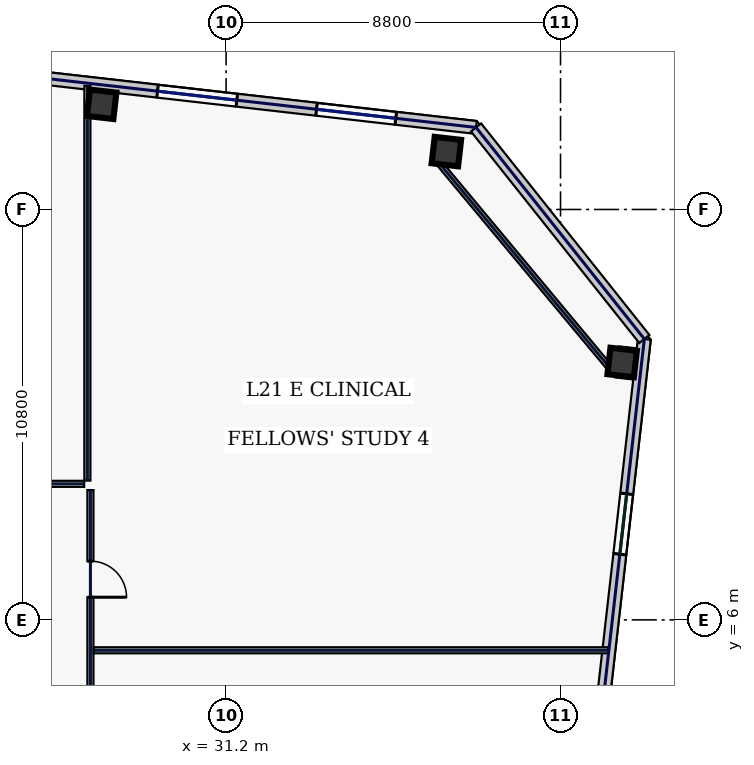
"""IFC4 building model, lengths in metres.
Left out: names, types, materials, properties, quantities, classifications, styles, units other than length and angle.
Written with IfcOpenShell. Run it as: python <this file> out.ifc"""

import sys

from ifc_helpers import new_model, si_unit, direction, frame, frame_2d, origin, origin_2d, place, context, subcontext, project, spatial, rectangle, hollow_rectangle, extrude, element, fill, save


model = new_model("IFC4")
c1 = context("Model", 3, precision=1e-05, world=origin(), true_north=direction((0.0, 1.0)))
c2 = subcontext(c1, "Body", "Model", "MODEL_VIEW")
j1 = project(units=[si_unit("LENGTHUNIT", "METRE"), si_unit("PLANEANGLEUNIT", "RADIAN")], contexts=[c1])
p1 = place(None, origin())
s1 = spatial("IfcSite", under=j1, at=p1, CompositionType="ELEMENT")
p2 = place(p1, origin())
s2 = spatial("IfcBuilding", under=s1, at=p2, CompositionType="ELEMENT")
p3 = place(p2, frame((0.0, 0.0, 97.4)))
s3 = spatial("IfcBuildingStorey", under=s2, at=p3, CompositionType="ELEMENT", Elevation=97.4)
for number, where, z_axis, x_axis in (
    (1, (36.997, 18.323, 0.0), (0.0, 0.0, 1.0), (0.994, -0.113, 0.0)),
    (2, (27.926, 19.568, 0.0), (0.0, 0.0, 1.0), (0.994, -0.113, 0.0)),
    (3, (41.622, 12.774, 0.0), (0.0, 0.0, 1.0), (0.994, -0.113, 0.0)),
):
    element("IfcColumn", number, at=place(p3, frame(where, z_axis=z_axis, x_axis=x_axis)), inside=s3, PredefinedType="COLUMN", context=c2, shape_type="SweptSolid", body=[
        extrude(hollow_rectangle(XDim=0.7, YDim=0.7, WallThickness=0.032, at=origin_2d()), origin(), (0.0, 0.0, 1.0), 3.74),
    ])
p4 = place(p3, frame((37.777, 18.958, 0.0), z_axis=(0.0, 0.0, 1.0), x_axis=(-0.993571362037, 0.113207546299, 0.0)))
e4 = element("IfcWall", 4, at=p4, inside=s3, PredefinedType="STANDARD", context=c2, shape_type="SweptSolid", body=[
    extrude(rectangle(XDim=21.223, YDim=0.34, at=frame_2d((10.611, 0.0))), origin(), (0.0, 0.0, 1.0), 3.74),
])
p5 = place(p4, frame((15.756, 0.0, 0.22)))
e5 = element("IfcOpeningElement", 5, at=p5, cuts=e4, PredefinedType="OPENING", context=c2, shape_type="SweptSolid", body=[
    extrude(rectangle(XDim=1.6, YDim=1.2, at=frame_2d((0.8, 0.6))), frame((0.0, 0.18, 0.0), z_axis=(0.0, -1.0, 0.0), x_axis=(1.0, 0.0, 0.0)), (0.0, 0.0, 1.0), 0.36),
])
p6 = place(p4, frame((11.285, 0.0, 0.67)))
e6 = element("IfcOpeningElement", 6, at=p6, cuts=e4, PredefinedType="OPENING", context=c2, shape_type="SweptSolid", body=[
    extrude(rectangle(XDim=2.1, YDim=2.2, at=frame_2d((1.05, 1.1))), frame((0.0, 0.18, 0.0), z_axis=(0.0, -1.0, 0.0), x_axis=(1.0, 0.0, 0.0)), (0.0, 0.0, 1.0), 0.36),
])
p7 = place(p4, frame((6.336, 0.0, 0.67)))
e7 = element("IfcOpeningElement", 7, at=p7, cuts=e4, PredefinedType="OPENING", context=c2, shape_type="SweptSolid", body=[
    extrude(rectangle(XDim=2.1, YDim=2.2, at=frame_2d((1.05, 1.1))), frame((0.0, 0.18, 0.0), z_axis=(0.0, -1.0, 0.0), x_axis=(1.0, 0.0, 0.0)), (0.0, 0.0, 1.0), 0.36),
])
p8 = place(p4, frame((2.125, 0.0, 0.67)))
e8 = element("IfcOpeningElement", 8, at=p8, cuts=e4, PredefinedType="OPENING", context=c2, shape_type="SweptSolid", body=[
    extrude(rectangle(XDim=2.1, YDim=2.2, at=frame_2d((1.05, 1.1))), frame((0.0, 0.18, 0.0), z_axis=(0.0, -1.0, 0.0), x_axis=(1.0, 0.0, 0.0)), (0.0, 0.0, 1.0), 0.36),
])
p9 = place(p3, frame((37.768, -25.556, 0.0), z_axis=(0.0, 0.0, 1.0), x_axis=(0.113201605824, 0.993572038877, 0.0)))
e9 = element("IfcWall", 9, at=p9, inside=s3, PredefinedType="STANDARD", context=c2, shape_type="SweptSolid", body=[
    extrude(rectangle(XDim=39.2, YDim=0.34, at=frame_2d((19.6, 0.0))), origin(), (0.0, 0.0, 1.0), 3.74),
])
p10 = place(p9, frame((4.1, 0.0, 0.58)))
e10 = element("IfcOpeningElement", 10, at=p10, cuts=e9, PredefinedType="OPENING", context=c2, shape_type="SweptSolid", body=[
    extrude(rectangle(XDim=1.6, YDim=2.3, at=frame_2d((0.8, 1.15))), frame((0.0, 0.18, 0.0), z_axis=(0.0, -1.0, 0.0), x_axis=(1.0, 0.0, 0.0)), (0.0, 0.0, 1.0), 0.36),
])
p11 = place(p9, frame((13.9, 0.0, 0.58)))
e11 = element("IfcOpeningElement", 11, at=p11, cuts=e9, PredefinedType="OPENING", context=c2, shape_type="SweptSolid", body=[
    extrude(rectangle(XDim=1.6, YDim=2.3, at=frame_2d((0.8, 1.15))), frame((0.0, 0.18, 0.0), z_axis=(0.0, -1.0, 0.0), x_axis=(1.0, 0.0, 0.0)), (0.0, 0.0, 1.0), 0.36),
])
p12 = place(p9, frame((23.7, 0.0, 0.58)))
e12 = element("IfcOpeningElement", 12, at=p12, cuts=e9, PredefinedType="OPENING", context=c2, shape_type="SweptSolid", body=[
    extrude(rectangle(XDim=1.6, YDim=2.3, at=frame_2d((0.8, 1.15))), frame((0.0, 0.18, 0.0), z_axis=(0.0, -1.0, 0.0), x_axis=(1.0, 0.0, 0.0)), (0.0, 0.0, 1.0), 0.36),
])
p13 = place(p9, frame((33.5, 0.0, 0.58)))
e13 = element("IfcOpeningElement", 13, at=p13, cuts=e9, PredefinedType="OPENING", context=c2, shape_type="SweptSolid", body=[
    extrude(rectangle(XDim=1.6, YDim=2.3, at=frame_2d((0.8, 1.15))), frame((0.0, 0.18, 0.0), z_axis=(0.0, -1.0, 0.0), x_axis=(1.0, 0.0, 0.0)), (0.0, 0.0, 1.0), 0.36),
])
p14 = place(p3, frame((42.206, 13.392, 0.0), z_axis=(0.0, 0.0, 1.0), x_axis=(-0.622524521309, 0.782600294128, 0.0)))
e14 = element("IfcWall", 14, at=p14, inside=s3, PredefinedType="STANDARD", context=c2, shape_type="SweptSolid", body=[
    extrude(rectangle(XDim=7.113, YDim=0.34, at=frame_2d((3.557, 0.0))), origin(), (0.0, 0.0, 1.0), 3.74),
])
p15 = place(p3, frame((41.361, 12.556, 0.0), z_axis=(0.0, 0.0, 1.0), x_axis=(-0.640217638562, 0.768193579298, 0.0)))
e15 = element("IfcWall", 15, at=p15, inside=s3, PredefinedType="PARTITIONING", context=c2, shape_type="SweptSolid", body=[
    extrude(rectangle(XDim=7.224, YDim=0.16, at=frame_2d((3.612, 0.0))), origin(), (0.0, 0.0, 1.0), 3.74),
])
p16 = place(p3, frame((16.765, 9.58, 0.0), z_axis=(0.0, 0.0, 1.0), x_axis=(1.0, 0.0, 0.0)))
e16 = element("IfcWall", 16, at=p16, inside=s3, PredefinedType="PARTITIONING", context=c2, shape_type="SweptSolid", body=[
    extrude(rectangle(XDim=10.7, YDim=0.16, at=frame_2d((5.35, 0.0))), origin(), (0.0, 0.0, 1.0), 3.74),
])
p17 = place(p16, frame((2.875, 0.0, 0.0)))
e17 = element("IfcOpeningElement", 17, at=p17, cuts=e16, PredefinedType="OPENING", context=c2, shape_type="SweptSolid", body=[
    extrude(rectangle(XDim=0.95, YDim=2.2, at=frame_2d((0.475, 1.1))), frame((0.0, 0.09, 0.0), z_axis=(0.0, -1.0, 0.0), x_axis=(1.0, 0.0, 0.0)), (0.0, 0.0, 1.0), 0.18),
])
p18 = place(p16, frame((7.876, 0.0, 0.0)))
e18 = element("IfcOpeningElement", 18, at=p18, cuts=e16, PredefinedType="OPENING", context=c2, shape_type="SweptSolid", body=[
    extrude(rectangle(XDim=0.95, YDim=2.2, at=frame_2d((0.475, 1.1))), frame((0.0, 0.09, 0.0), z_axis=(0.0, -1.0, 0.0), x_axis=(1.0, 0.0, 0.0)), (0.0, 0.0, 1.0), 0.18),
])
p19 = place(p3, frame((27.63, 9.415, 0.0), z_axis=(0.0, 0.0, 1.0), x_axis=(0.0, -1.0, 0.0)))
e19 = element("IfcWall", 19, at=p19, inside=s3, PredefinedType="PARTITIONING", context=c2, shape_type="SweptSolid", body=[
    extrude(rectangle(XDim=18.63, YDim=0.16, at=frame_2d((9.315, 0.0))), origin(), (0.0, 0.0, 1.0), 3.74),
])
p20 = place(p19, frame((16.081, 0.0, 0.0)))
e20 = element("IfcOpeningElement", 20, at=p20, cuts=e19, PredefinedType="OPENING", context=c2, shape_type="SweptSolid", body=[
    extrude(rectangle(XDim=0.95, YDim=2.2, at=frame_2d((0.475, 1.1))), frame((0.0, 0.09, 0.0), z_axis=(0.0, -1.0, 0.0), x_axis=(1.0, 0.0, 0.0)), (0.0, 0.0, 1.0), 0.18),
])
p21 = place(p19, frame((11.3, 0.0, 0.0)))
e21 = element("IfcOpeningElement", 21, at=p21, cuts=e19, PredefinedType="OPENING", context=c2, shape_type="SweptSolid", body=[
    extrude(rectangle(XDim=0.95, YDim=2.2, at=frame_2d((0.475, 1.1))), frame((0.0, 0.09, 0.0), z_axis=(0.0, -1.0, 0.0), x_axis=(1.0, 0.0, 0.0)), (0.0, 0.0, 1.0), 0.18),
])
p22 = place(p19, frame((5.8, 0.0, 0.0)))
e22 = element("IfcOpeningElement", 22, at=p22, cuts=e19, PredefinedType="OPENING", context=c2, shape_type="SweptSolid", body=[
    extrude(rectangle(XDim=0.95, YDim=2.2, at=frame_2d((0.475, 1.1))), frame((0.0, 0.09, 0.0), z_axis=(0.0, -1.0, 0.0), x_axis=(1.0, 0.0, 0.0)), (0.0, 0.0, 1.0), 0.18),
])
p23 = place(p19, frame((1.869, 0.0, 0.0)))
e23 = element("IfcOpeningElement", 23, at=p23, cuts=e19, PredefinedType="OPENING", context=c2, shape_type="SweptSolid", body=[
    extrude(rectangle(XDim=0.95, YDim=2.2, at=frame_2d((0.475, 1.1))), frame((0.0, 0.09, 0.0), z_axis=(0.0, -1.0, 0.0), x_axis=(1.0, 0.0, 0.0)), (0.0, 0.0, 1.0), 0.18),
])
p24 = place(p3, frame((27.55, 9.665, 0.0), z_axis=(0.0, 0.0, 1.0), x_axis=(0.0, 1.0, 0.0)))
e24 = element("IfcWall", 24, at=p24, inside=s3, PredefinedType="PARTITIONING", context=c2, shape_type="SweptSolid", body=[
    extrude(rectangle(XDim=10.388, YDim=0.16, at=frame_2d((5.194, 0.0))), origin(), (0.0, 0.0, 1.0), 3.74),
])
p25 = place(p3, frame((27.715, 5.2, 0.0), z_axis=(0.0, 0.0, 1.0), x_axis=(1.0, 0.0, 0.0)))
e25 = element("IfcWall", 25, at=p25, inside=s3, PredefinedType="PARTITIONING", context=c2, shape_type="SweptSolid", body=[
    extrude(rectangle(XDim=13.537, YDim=0.16, at=frame_2d((6.769, 0.0))), origin(), (0.0, 0.0, 1.0), 3.74),
])
p26 = place(p7, origin())
e26 = element("IfcWindow", 26, at=p26, inside=s3, PartitioningType="SINGLE_PANEL", PredefinedType="WINDOW", context=c2, shape_type="SweptSolid", body=[
    extrude(rectangle(XDim=2.1, YDim=2.2, at=frame_2d((1.05, 1.1))), frame((0.0, 0.03, 0.0), z_axis=(0.0, -1.0, 0.0), x_axis=(1.0, 0.0, 0.0)), (0.0, 0.0, 1.0), 0.06),
])
fill(e7, e26)
p27 = place(p8, origin())
e27 = element("IfcWindow", 27, at=p27, inside=s3, PartitioningType="SINGLE_PANEL", PredefinedType="WINDOW", context=c2, shape_type="SweptSolid", body=[
    extrude(rectangle(XDim=2.1, YDim=2.2, at=frame_2d((1.05, 1.1))), frame((0.0, 0.03, 0.0), z_axis=(0.0, -1.0, 0.0), x_axis=(1.0, 0.0, 0.0)), (0.0, 0.0, 1.0), 0.06),
])
fill(e8, e27)
p28 = place(p13, origin())
e28 = element("IfcWindow", 28, at=p28, inside=s3, PartitioningType="SINGLE_PANEL", PredefinedType="WINDOW", context=c2, shape_type="SweptSolid", body=[
    extrude(rectangle(XDim=1.6, YDim=2.3, at=frame_2d((0.8, 1.15))), frame((0.0, 0.03, 0.0), z_axis=(0.0, -1.0, 0.0), x_axis=(1.0, 0.0, 0.0)), (0.0, 0.0, 1.0), 0.06),
])
fill(e13, e28)
p29 = place(p23, origin())
e29 = element("IfcDoor", 29, at=p29, inside=s3, OperationType="SINGLE_SWING_RIGHT", PredefinedType="DOOR", context=c2, shape_type="SweptSolid", body=[
    extrude(rectangle(XDim=0.95, YDim=2.2, at=frame_2d((0.475, 1.1))), frame((0.0, 0.025, 0.0), z_axis=(0.0, -1.0, 0.0), x_axis=(1.0, 0.0, 0.0)), (0.0, 0.0, 1.0), 0.05),
])
fill(e23, e29)
save(model, sys.argv[1])
